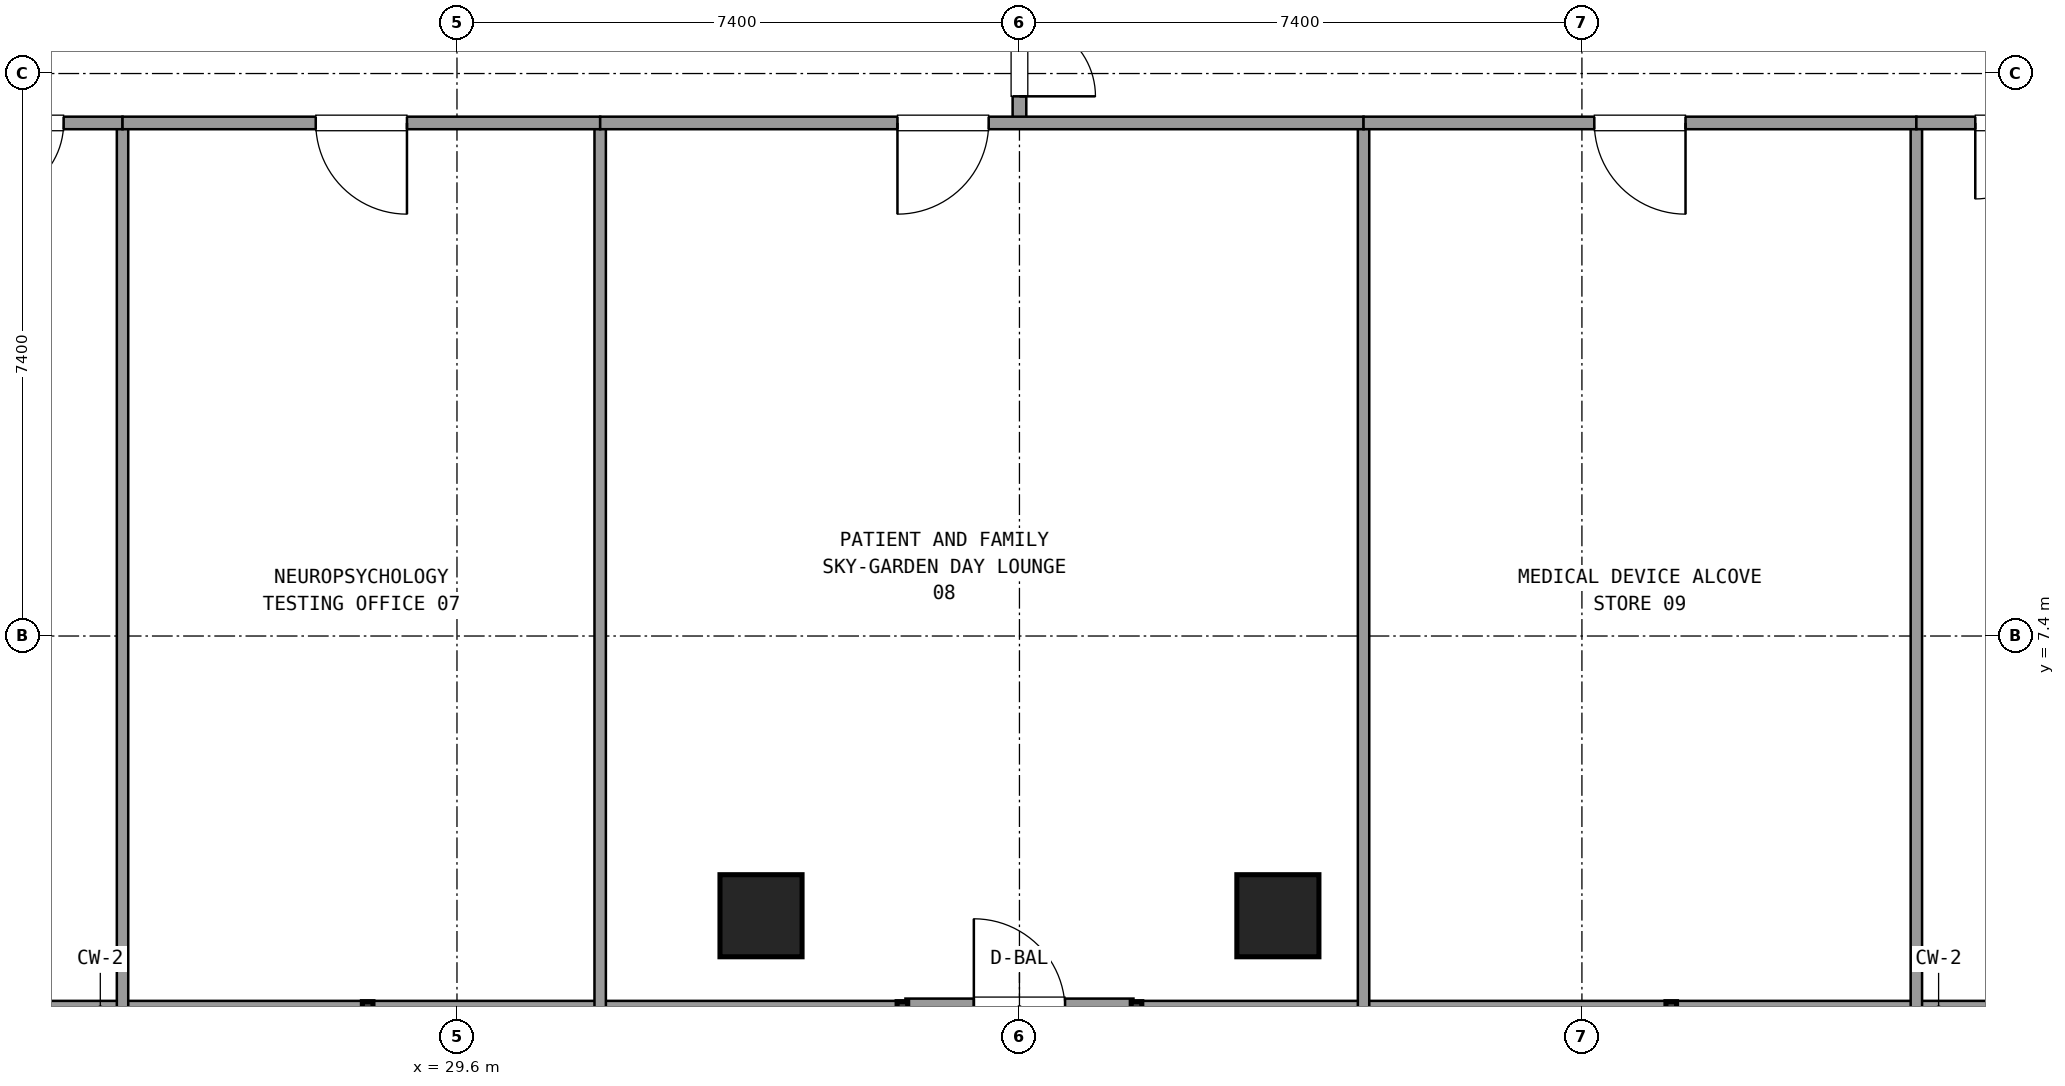
"""IFC4 building model, lengths in metres.
Left out: names, types, materials, properties, quantities, classifications, styles, units other than length and angle.
Written with IfcOpenShell. Run it as: python <this file> out.ifc"""

import sys

from ifc_helpers import new_model, si_unit, direction, frame, frame_2d, origin, origin_2d, place, context, subcontext, project, spatial, rectangle, extrude, element, fill, save


model = new_model("IFC4")
c1 = context("Model", 3, precision=1e-05, world=origin(), true_north=direction((0.0, 1.0)))
c2 = subcontext(c1, "Body", "Model", "MODEL_VIEW")
j1 = project(units=[si_unit("LENGTHUNIT", "METRE"), si_unit("PLANEANGLEUNIT", "RADIAN")], contexts=[c1])
p1 = place(None, origin())
s1 = spatial("IfcSite", under=j1, at=p1, CompositionType="ELEMENT")
p2 = place(p1, origin())
s2 = spatial("IfcBuilding", under=s1, at=p2, CompositionType="ELEMENT")
p3 = place(p2, frame((0.0, 0.0, 63.54)))
s3 = spatial("IfcBuildingStorey", under=s2, at=p3, CompositionType="ELEMENT", Elevation=63.54)
for number, where, z_axis, x_axis in (
    (1, (33.6, 3.72, 0.0), (0.0, 0.0, 1.0), (1.0, 0.0, 0.0)),
    (2, (40.4, 3.72, 0.0), (0.0, 0.0, 1.0), (1.0, 0.0, 0.0)),
):
    element("IfcColumn", number, at=place(p3, frame(where, z_axis=z_axis, x_axis=x_axis)), inside=s3, PredefinedType="COLUMN", context=c2, shape_type="SweptSolid", body=[
        extrude(rectangle(XDim=1.08, YDim=1.08, at=origin_2d()), origin(), (0.0, 0.0, 1.0), 3.6),
    ])
p4 = place(p3, frame((35.5, 2.48, 0.0), z_axis=(0.0, 0.0, 1.0), x_axis=(1.0, 0.0, 0.0)))
e3 = element("IfcWall", 3, at=p4, inside=s3, PredefinedType="SOLIDWALL", context=c2, shape_type="SweptSolid", body=[
    extrude(rectangle(XDim=3.0, YDim=0.3, at=frame_2d((1.5, 0.0))), origin(), (0.0, 0.0, 1.0), 2.65),
])
p5 = place(p4, frame((0.9, 0.0, 0.0)))
e4 = element("IfcOpeningElement", 4, at=p5, cuts=e3, PredefinedType="OPENING", context=c2, shape_type="SweptSolid", body=[
    extrude(rectangle(XDim=1.2, YDim=2.2, at=frame_2d((0.6, 1.1))), frame((0.0, 0.16, 0.0), z_axis=(0.0, -1.0, 0.0), x_axis=(1.0, 0.0, 0.0)), (0.0, 0.0, 1.0), 0.32),
])
for number, where, z_axis, x_axis in (
    (5, (14.355, 2.48, 0.0), (0.0, 0.0, 1.0), (1.0, 0.0, 0.0)),
    (6, (38.54, 2.48, 0.0), (0.0, 0.0, 1.0), (1.0, 0.0, 0.0)),
):
    element("IfcWall", number, at=place(p3, frame(where, z_axis=z_axis, x_axis=x_axis)), inside=s3, PredefinedType="SOLIDWALL", context=c2, shape_type="SweptSolid", body=[
        extrude(rectangle(XDim=21.105, YDim=0.24, at=frame_2d((10.552, 0.0))), origin(), (0.0, 0.0, 1.0), 0.85),
    ])
p6 = place(p3, frame((37.0, 14.15, 0.0), z_axis=(0.0, 0.0, 1.0), x_axis=(0.0, 1.0, 0.0)))
e7 = element("IfcWall", 7, at=p6, inside=s3, PredefinedType="PARTITIONING", context=c2, shape_type="SweptSolid", body=[
    extrude(rectangle(XDim=2.7, YDim=0.18, at=frame_2d((1.35, 0.0))), origin(), (0.0, 0.0, 1.0), 2.61),
])
p7 = place(p6, frame((0.35, 0.0, 0.0)))
e8 = element("IfcOpeningElement", 8, at=p7, cuts=e7, PredefinedType="OPENING", context=c2, shape_type="SweptSolid", body=[
    extrude(rectangle(XDim=2.0, YDim=2.2, at=frame_2d((1.0, 1.1))), frame((0.0, 0.1, 0.0), z_axis=(0.0, -1.0, 0.0), x_axis=(1.0, 0.0, 0.0)), (0.0, 0.0, 1.0), 0.2),
])
p8 = place(p3, frame((25.2, 14.15, 0.0), z_axis=(0.0, 0.0, 1.0), x_axis=(0.0, -1.0, 0.0)))
e9 = element("IfcWall", 9, at=p8, inside=s3, PredefinedType="PARTITIONING", context=c2, shape_type="SweptSolid", body=[
    extrude(rectangle(XDim=11.65, YDim=0.15, at=frame_2d((5.825, 0.0))), origin(), (0.0, 0.0, 1.0), 2.61),
])
p9 = place(p3, frame((22.65, 14.15, 0.0), z_axis=(0.0, 0.0, 1.0), x_axis=(1.0, 0.0, 0.0)))
e10 = element("IfcWall", 10, at=p9, inside=s3, PredefinedType="PARTITIONING", context=c2, shape_type="SweptSolid", body=[
    extrude(rectangle(XDim=2.55, YDim=0.165, at=frame_2d((1.275, 0.0))), origin(), (0.0, 0.0, 1.0), 2.61),
])
p10 = place(p9, frame((0.775, 0.0, 0.0)))
e11 = element("IfcOpeningElement", 11, at=p10, cuts=e10, PredefinedType="OPENING", context=c2, shape_type="SweptSolid", body=[
    extrude(rectangle(XDim=1.0, YDim=2.15, at=frame_2d((0.5, 1.075))), frame((0.0, 0.093, 0.0), z_axis=(0.0, -1.0, 0.0), x_axis=(1.0, 0.0, 0.0)), (0.0, 0.0, 1.0), 0.185),
])
p11 = place(p3, frame((31.484, 14.15, 0.0), z_axis=(0.0, 0.0, 1.0), x_axis=(0.0, -1.0, 0.0)))
e12 = element("IfcWall", 12, at=p11, inside=s3, PredefinedType="PARTITIONING", context=c2, shape_type="SweptSolid", body=[
    extrude(rectangle(XDim=11.65, YDim=0.15, at=frame_2d((5.825, 0.0))), origin(), (0.0, 0.0, 1.0), 2.61),
])
p12 = place(p3, frame((25.2, 14.15, 0.0), z_axis=(0.0, 0.0, 1.0), x_axis=(1.0, 0.0, 0.0)))
e13 = element("IfcWall", 13, at=p12, inside=s3, PredefinedType="PARTITIONING", context=c2, shape_type="SweptSolid", body=[
    extrude(rectangle(XDim=6.284, YDim=0.165, at=frame_2d((3.142, 0.0))), origin(), (0.0, 0.0, 1.0), 2.61),
])
p13 = place(p12, frame((2.542, 0.0, 0.0)))
e14 = element("IfcOpeningElement", 14, at=p13, cuts=e13, PredefinedType="OPENING", context=c2, shape_type="SweptSolid", body=[
    extrude(rectangle(XDim=1.2, YDim=2.15, at=frame_2d((0.6, 1.075))), frame((0.0, 0.093, 0.0), z_axis=(0.0, -1.0, 0.0), x_axis=(1.0, 0.0, 0.0)), (0.0, 0.0, 1.0), 0.185),
])
p14 = place(p3, frame((41.527, 14.15, 0.0), z_axis=(0.0, 0.0, 1.0), x_axis=(0.0, -1.0, 0.0)))
e15 = element("IfcWall", 15, at=p14, inside=s3, PredefinedType="PARTITIONING", context=c2, shape_type="SweptSolid", body=[
    extrude(rectangle(XDim=11.65, YDim=0.15, at=frame_2d((5.825, 0.0))), origin(), (0.0, 0.0, 1.0), 2.61),
])
p15 = place(p3, frame((31.484, 14.15, 0.0), z_axis=(0.0, 0.0, 1.0), x_axis=(1.0, 0.0, 0.0)))
e16 = element("IfcWall", 16, at=p15, inside=s3, PredefinedType="PARTITIONING", context=c2, shape_type="SweptSolid", body=[
    extrude(rectangle(XDim=10.043, YDim=0.165, at=frame_2d((5.021, 0.0))), origin(), (0.0, 0.0, 1.0), 2.61),
])
p16 = place(p15, frame((3.911, 0.0, 0.0)))
e17 = element("IfcOpeningElement", 17, at=p16, cuts=e16, PredefinedType="OPENING", context=c2, shape_type="SweptSolid", body=[
    extrude(rectangle(XDim=1.2, YDim=2.15, at=frame_2d((0.6, 1.075))), frame((0.0, 0.093, 0.0), z_axis=(0.0, -1.0, 0.0), x_axis=(1.0, 0.0, 0.0)), (0.0, 0.0, 1.0), 0.185),
])
p17 = place(p3, frame((48.8, 14.15, 0.0), z_axis=(0.0, 0.0, 1.0), x_axis=(0.0, -1.0, 0.0)))
e18 = element("IfcWall", 18, at=p17, inside=s3, PredefinedType="PARTITIONING", context=c2, shape_type="SweptSolid", body=[
    extrude(rectangle(XDim=11.65, YDim=0.15, at=frame_2d((5.825, 0.0))), origin(), (0.0, 0.0, 1.0), 2.61),
])
p18 = place(p3, frame((41.527, 14.15, 0.0), z_axis=(0.0, 0.0, 1.0), x_axis=(1.0, 0.0, 0.0)))
e19 = element("IfcWall", 19, at=p18, inside=s3, PredefinedType="PARTITIONING", context=c2, shape_type="SweptSolid", body=[
    extrude(rectangle(XDim=7.273, YDim=0.165, at=frame_2d((3.636, 0.0))), origin(), (0.0, 0.0, 1.0), 2.61),
])
p19 = place(p18, frame((3.036, 0.0, 0.0)))
e20 = element("IfcOpeningElement", 20, at=p19, cuts=e19, PredefinedType="OPENING", context=c2, shape_type="SweptSolid", body=[
    extrude(rectangle(XDim=1.2, YDim=2.15, at=frame_2d((0.6, 1.075))), frame((0.0, 0.093, 0.0), z_axis=(0.0, -1.0, 0.0), x_axis=(1.0, 0.0, 0.0)), (0.0, 0.0, 1.0), 0.185),
])
p20 = place(p3, frame((48.8, 14.15, 0.0), z_axis=(0.0, 0.0, 1.0), x_axis=(1.0, 0.0, 0.0)))
e21 = element("IfcWall", 21, at=p20, inside=s3, PredefinedType="PARTITIONING", context=c2, shape_type="SweptSolid", body=[
    extrude(rectangle(XDim=2.55, YDim=0.165, at=frame_2d((1.275, 0.0))), origin(), (0.0, 0.0, 1.0), 2.61),
])
p21 = place(p20, frame((0.775, 0.0, 0.0)))
e22 = element("IfcOpeningElement", 22, at=p21, cuts=e21, PredefinedType="OPENING", context=c2, shape_type="SweptSolid", body=[
    extrude(rectangle(XDim=1.0, YDim=2.15, at=frame_2d((0.5, 1.075))), frame((0.0, 0.093, 0.0), z_axis=(0.0, -1.0, 0.0), x_axis=(1.0, 0.0, 0.0)), (0.0, 0.0, 1.0), 0.185),
])
p22 = place(p7, frame((2.0, 0.0, 0.0), z_axis=(0.0, 0.0, 1.0), x_axis=(-1.0, 0.0, 0.0)))
e23 = element("IfcDoor", 23, at=p22, inside=s3, OperationType="DOUBLE_DOOR_SINGLE_SWING", PredefinedType="DOOR", context=c2, shape_type="SweptSolid", body=[
    extrude(rectangle(XDim=2.0, YDim=2.2, at=frame_2d((1.0, 1.1))), frame((0.0, 0.025, 0.0), z_axis=(0.0, -1.0, 0.0), x_axis=(1.0, 0.0, 0.0)), (0.0, 0.0, 1.0), 0.05),
])
fill(e8, e23)
p23 = place(p10, frame((1.0, 0.0, 0.0), z_axis=(0.0, 0.0, 1.0), x_axis=(-1.0, 0.0, 0.0)))
e24 = element("IfcDoor", 24, at=p23, inside=s3, OperationType="SINGLE_SWING_LEFT", PredefinedType="DOOR", context=c2, shape_type="SweptSolid", body=[
    extrude(rectangle(XDim=1.0, YDim=2.15, at=frame_2d((0.5, 1.075))), frame((0.0, 0.025, 0.0), z_axis=(0.0, -1.0, 0.0), x_axis=(1.0, 0.0, 0.0)), (0.0, 0.0, 1.0), 0.05),
])
fill(e11, e24)
p24 = place(p13, frame((1.2, 0.0, 0.0), z_axis=(0.0, 0.0, 1.0), x_axis=(-1.0, 0.0, 0.0)))
e25 = element("IfcDoor", 25, at=p24, inside=s3, OperationType="SINGLE_SWING_RIGHT", PredefinedType="DOOR", context=c2, shape_type="SweptSolid", body=[
    extrude(rectangle(XDim=1.2, YDim=2.15, at=frame_2d((0.6, 1.075))), frame((0.0, 0.025, 0.0), z_axis=(0.0, -1.0, 0.0), x_axis=(1.0, 0.0, 0.0)), (0.0, 0.0, 1.0), 0.05),
])
fill(e14, e25)
p25 = place(p16, frame((1.2, 0.0, 0.0), z_axis=(0.0, 0.0, 1.0), x_axis=(-1.0, 0.0, 0.0)))
e26 = element("IfcDoor", 26, at=p25, inside=s3, OperationType="SINGLE_SWING_LEFT", PredefinedType="DOOR", context=c2, shape_type="SweptSolid", body=[
    extrude(rectangle(XDim=1.2, YDim=2.15, at=frame_2d((0.6, 1.075))), frame((0.0, 0.025, 0.0), z_axis=(0.0, -1.0, 0.0), x_axis=(1.0, 0.0, 0.0)), (0.0, 0.0, 1.0), 0.05),
])
fill(e17, e26)
p26 = place(p19, frame((1.2, 0.0, 0.0), z_axis=(0.0, 0.0, 1.0), x_axis=(-1.0, 0.0, 0.0)))
e27 = element("IfcDoor", 27, at=p26, inside=s3, OperationType="SINGLE_SWING_RIGHT", PredefinedType="DOOR", context=c2, shape_type="SweptSolid", body=[
    extrude(rectangle(XDim=1.2, YDim=2.15, at=frame_2d((0.6, 1.075))), frame((0.0, 0.025, 0.0), z_axis=(0.0, -1.0, 0.0), x_axis=(1.0, 0.0, 0.0)), (0.0, 0.0, 1.0), 0.05),
])
fill(e20, e27)
p27 = place(p21, frame((1.0, 0.0, 0.0), z_axis=(0.0, 0.0, 1.0), x_axis=(-1.0, 0.0, 0.0)))
e28 = element("IfcDoor", 28, at=p27, inside=s3, OperationType="SINGLE_SWING_LEFT", PredefinedType="DOOR", context=c2, shape_type="SweptSolid", body=[
    extrude(rectangle(XDim=1.0, YDim=2.15, at=frame_2d((0.5, 1.075))), frame((0.0, 0.025, 0.0), z_axis=(0.0, -1.0, 0.0), x_axis=(1.0, 0.0, 0.0)), (0.0, 0.0, 1.0), 0.05),
])
fill(e22, e28)
save(model, sys.argv[1])
